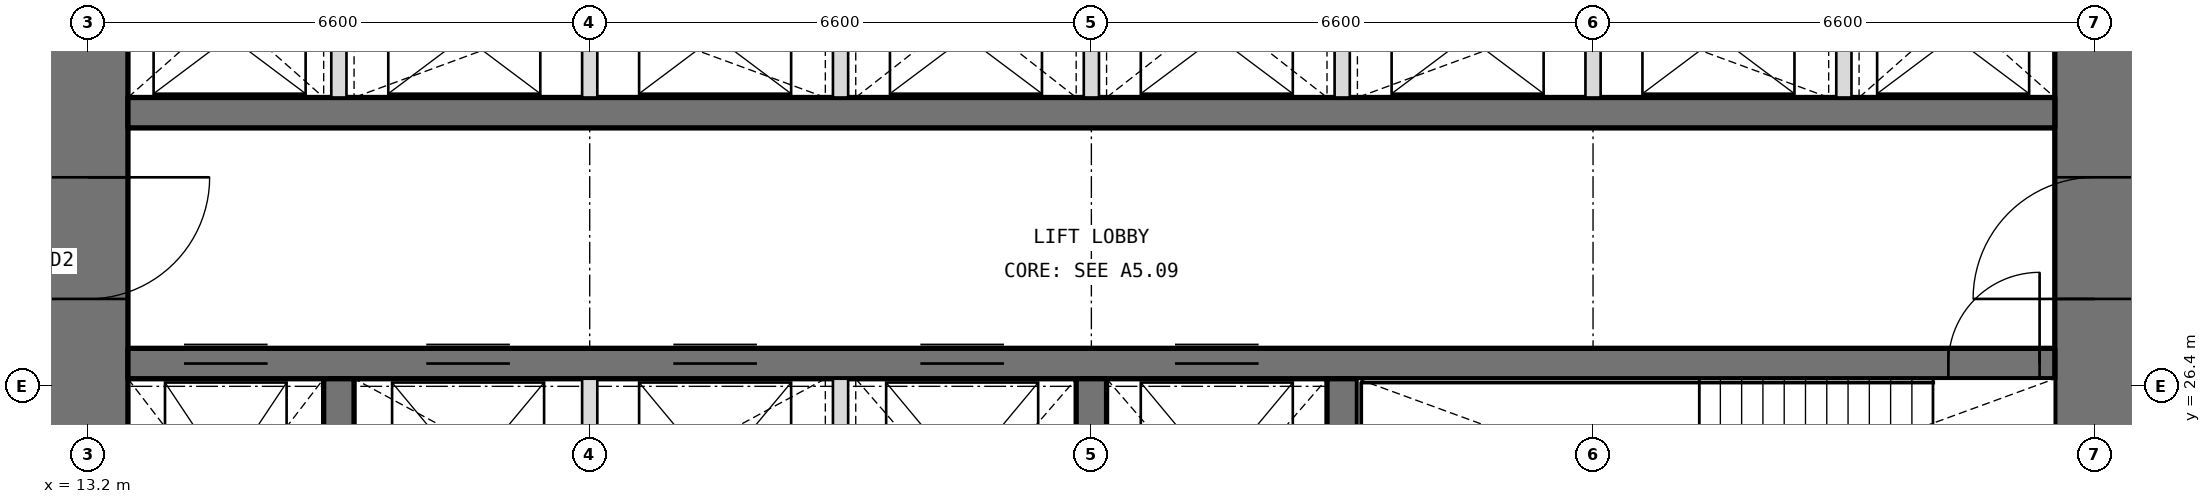
"""IFC4 building model, lengths in metres.
Left out: names, types, materials, properties, quantities, classifications, styles, units other than length and angle.
Written with IfcOpenShell. Run it as: python <this file> out.ifc"""

import sys

from ifc_helpers import new_model, si_unit, direction, frame, frame_2d, origin, place, context, subcontext, project, spatial, rectangle, extrude, element, fill, save


model = new_model("IFC4")
c1 = context("Model", 3, precision=1e-05, world=origin(), true_north=direction((0.0, 1.0)))
c2 = subcontext(c1, "Body", "Model", "MODEL_VIEW")
j1 = project(units=[si_unit("LENGTHUNIT", "METRE"), si_unit("PLANEANGLEUNIT", "RADIAN")], contexts=[c1])
p1 = place(None, origin())
s1 = spatial("IfcSite", under=j1, at=p1, CompositionType="ELEMENT")
p2 = place(p1, origin())
s2 = spatial("IfcBuilding", under=s1, at=p2, CompositionType="ELEMENT")
p3 = place(p2, frame((0.0, 0.0, 33.9)))
s3 = spatial("IfcBuildingStorey", under=s2, at=p3, CompositionType="ELEMENT", Elevation=33.9)
p4 = place(p3, frame((39.6, 13.725, 0.0), z_axis=(0.0, 0.0, 1.0), x_axis=(0.0, 1.0, 0.0)))
e1 = element("IfcWall", 1, at=p4, inside=s3, PredefinedType="SHEAR", context=c2, shape_type="SweptSolid", body=[
    extrude(rectangle(XDim=18.75, YDim=1.05, at=frame_2d((9.375, 0.0))), origin(), (0.0, 0.0, 1.0), 4.2),
])
p5 = place(p4, frame((3.025, 0.0, 0.0)))
e2 = element("IfcOpeningElement", 2, at=p5, cuts=e1, PredefinedType="OPENING", context=c2, shape_type="SweptSolid", body=[
    extrude(rectangle(XDim=1.6, YDim=2.1, at=frame_2d((0.8, 1.05))), frame((0.0, 0.535, 0.0), z_axis=(0.0, -1.0, 0.0), x_axis=(1.0, 0.0, 0.0)), (0.0, 0.0, 1.0), 1.07),
])
p6 = place(p4, frame((13.825, 0.0, 0.0)))
e3 = element("IfcOpeningElement", 3, at=p6, cuts=e1, PredefinedType="OPENING", context=c2, shape_type="SweptSolid", body=[
    extrude(rectangle(XDim=1.6, YDim=2.1, at=frame_2d((0.8, 1.05))), frame((0.0, 0.535, 0.0), z_axis=(0.0, -1.0, 0.0), x_axis=(1.0, 0.0, 0.0)), (0.0, 0.0, 1.0), 1.07),
])
p7 = place(p3, frame((13.2, 32.475, 0.0), z_axis=(0.0, 0.0, 1.0), x_axis=(0.0, -1.0, 0.0)))
e4 = element("IfcWall", 4, at=p7, inside=s3, PredefinedType="SHEAR", context=c2, shape_type="SweptSolid", body=[
    extrude(rectangle(XDim=18.75, YDim=1.05, at=frame_2d((9.375, 0.0))), origin(), (0.0, 0.0, 1.0), 4.2),
])
p8 = place(p7, frame((14.125, 0.0, 0.0)))
e5 = element("IfcOpeningElement", 5, at=p8, cuts=e4, PredefinedType="OPENING", context=c2, shape_type="SweptSolid", body=[
    extrude(rectangle(XDim=1.6, YDim=2.1, at=frame_2d((0.8, 1.05))), frame((0.0, 0.535, 0.0), z_axis=(0.0, -1.0, 0.0), x_axis=(1.0, 0.0, 0.0)), (0.0, 0.0, 1.0), 1.07),
])
p9 = place(p7, frame((3.325, 0.0, 0.0)))
e6 = element("IfcOpeningElement", 6, at=p9, cuts=e4, PredefinedType="OPENING", context=c2, shape_type="SweptSolid", body=[
    extrude(rectangle(XDim=1.6, YDim=2.1, at=frame_2d((0.8, 1.05))), frame((0.0, 0.535, 0.0), z_axis=(0.0, -1.0, 0.0), x_axis=(1.0, 0.0, 0.0)), (0.0, 0.0, 1.0), 1.07),
])
p10 = place(p3, frame((13.725, 26.7, 0.0), z_axis=(0.0, 0.0, 1.0), x_axis=(1.0, 0.0, 0.0)))
e7 = element("IfcWall", 7, at=p10, inside=s3, PredefinedType="SHEAR", context=c2, shape_type="SweptSolid", body=[
    extrude(rectangle(XDim=25.35, YDim=0.4, at=frame_2d((12.675, 0.0))), origin(), (0.0, 0.0, 1.0), 4.2),
])
p11 = place(p10, frame((23.95, 0.0, 0.0)))
e8 = element("IfcOpeningElement", 8, at=p11, cuts=e7, PredefinedType="OPENING", context=c2, shape_type="SweptSolid", body=[
    extrude(rectangle(XDim=1.2, YDim=2.1, at=frame_2d((0.6, 1.05))), frame((0.0, 0.21, 0.0), z_axis=(0.0, -1.0, 0.0), x_axis=(1.0, 0.0, 0.0)), (0.0, 0.0, 1.0), 0.42),
])
p12 = place(p10, frame((0.738, 0.0, 0.0)))
e9 = element("IfcOpeningElement", 9, at=p12, cuts=e7, PredefinedType="OPENING", context=c2, shape_type="SweptSolid", body=[
    extrude(rectangle(XDim=1.1, YDim=2.1, at=frame_2d((0.55, 1.05))), frame((0.0, 0.21, 0.0), z_axis=(0.0, -1.0, 0.0), x_axis=(1.0, 0.0, 0.0)), (0.0, 0.0, 1.0), 0.42),
])
p13 = place(p10, frame((3.925, 0.0, 0.0)))
e10 = element("IfcOpeningElement", 10, at=p13, cuts=e7, PredefinedType="OPENING", context=c2, shape_type="SweptSolid", body=[
    extrude(rectangle(XDim=1.1, YDim=2.1, at=frame_2d((0.55, 1.05))), frame((0.0, 0.21, 0.0), z_axis=(0.0, -1.0, 0.0), x_axis=(1.0, 0.0, 0.0)), (0.0, 0.0, 1.0), 0.42),
])
p14 = place(p10, frame((7.175, 0.0, 0.0)))
e11 = element("IfcOpeningElement", 11, at=p14, cuts=e7, PredefinedType="OPENING", context=c2, shape_type="SweptSolid", body=[
    extrude(rectangle(XDim=1.1, YDim=2.1, at=frame_2d((0.55, 1.05))), frame((0.0, 0.21, 0.0), z_axis=(0.0, -1.0, 0.0), x_axis=(1.0, 0.0, 0.0)), (0.0, 0.0, 1.0), 0.42),
])
p15 = place(p10, frame((10.425, 0.0, 0.0)))
e12 = element("IfcOpeningElement", 12, at=p15, cuts=e7, PredefinedType="OPENING", context=c2, shape_type="SweptSolid", body=[
    extrude(rectangle(XDim=1.1, YDim=2.1, at=frame_2d((0.55, 1.05))), frame((0.0, 0.21, 0.0), z_axis=(0.0, -1.0, 0.0), x_axis=(1.0, 0.0, 0.0)), (0.0, 0.0, 1.0), 0.42),
])
p16 = place(p10, frame((13.775, 0.0, 0.0)))
e13 = element("IfcOpeningElement", 13, at=p16, cuts=e7, PredefinedType="OPENING", context=c2, shape_type="SweptSolid", body=[
    extrude(rectangle(XDim=1.1, YDim=2.1, at=frame_2d((0.55, 1.05))), frame((0.0, 0.21, 0.0), z_axis=(0.0, -1.0, 0.0), x_axis=(1.0, 0.0, 0.0)), (0.0, 0.0, 1.0), 0.42),
])
p17 = place(p3, frame((13.725, 30.0, 0.0), z_axis=(0.0, 0.0, 1.0), x_axis=(1.0, 0.0, 0.0)))
e14 = element("IfcWall", 14, at=p17, inside=s3, PredefinedType="SHEAR", context=c2, shape_type="SweptSolid", body=[
    extrude(rectangle(XDim=25.35, YDim=0.4, at=frame_2d((12.675, 0.0))), origin(), (0.0, 0.0, 1.0), 4.2),
])
for number, where, z_axis, x_axis in (
    (15, (16.5, 23.15, 0.0), (0.0, 0.0, 1.0), (0.0, 1.0, 0.0)),
    (16, (26.4, 23.15, 0.0), (0.0, 0.0, 1.0), (0.0, 1.0, 0.0)),
    (17, (29.7, 23.15, 0.0), (0.0, 0.0, 1.0), (0.0, 1.0, 0.0)),
):
    element("IfcWall", number, at=place(p3, frame(where, z_axis=z_axis, x_axis=x_axis)), inside=s3, PredefinedType="SHEAR", context=c2, shape_type="SweptSolid", body=[
        extrude(rectangle(XDim=3.35, YDim=0.4, at=frame_2d((1.675, 0.0))), origin(), (0.0, 0.0, 1.0), 4.2),
    ])
for number, where, z_axis, x_axis in (
    (18, (16.5, 30.2, 0.0), (0.0, 0.0, 1.0), (0.0, 1.0, 0.0)),
    (19, (19.8, 30.2, 0.0), (0.0, 0.0, 1.0), (0.0, 1.0, 0.0)),
    (20, (23.1, 30.2, 0.0), (0.0, 0.0, 1.0), (0.0, 1.0, 0.0)),
    (21, (26.4, 30.2, 0.0), (0.0, 0.0, 1.0), (0.0, 1.0, 0.0)),
    (22, (29.7, 30.2, 0.0), (0.0, 0.0, 1.0), (0.0, 1.0, 0.0)),
    (23, (33.0, 30.2, 0.0), (0.0, 0.0, 1.0), (0.0, 1.0, 0.0)),
    (24, (36.3, 30.2, 0.0), (0.0, 0.0, 1.0), (0.0, 1.0, 0.0)),
):
    element("IfcWall", number, at=place(p3, frame(where, z_axis=z_axis, x_axis=x_axis)), inside=s3, PredefinedType="PARTITIONING", context=c2, shape_type="SweptSolid", body=[
        extrude(rectangle(XDim=2.275, YDim=0.2, at=frame_2d((1.138, 0.0))), origin(), (0.0, 0.0, 1.0), 4.2),
    ])
for number, where, z_axis, x_axis in (
    (25, (19.8, 23.15, 0.0), (0.0, 0.0, 1.0), (0.0, 1.0, 0.0)),
    (26, (23.1, 23.15, 0.0), (0.0, 0.0, 1.0), (0.0, 1.0, 0.0)),
):
    element("IfcWall", number, at=place(p3, frame(where, z_axis=z_axis, x_axis=x_axis)), inside=s3, PredefinedType="PARTITIONING", context=c2, shape_type="SweptSolid", body=[
        extrude(rectangle(XDim=3.35, YDim=0.2, at=frame_2d((1.675, 0.0))), origin(), (0.0, 0.0, 1.0), 4.2),
    ])
p18 = place(p11, origin())
e27 = element("IfcDoor", 27, at=p18, inside=s3, OperationType="SINGLE_SWING_RIGHT", PredefinedType="DOOR", context=c2, shape_type="SweptSolid", body=[
    extrude(rectangle(XDim=1.2, YDim=2.1, at=frame_2d((0.6, 1.05))), frame((0.0, 0.025, 0.0), z_axis=(0.0, -1.0, 0.0), x_axis=(1.0, 0.0, 0.0)), (0.0, 0.0, 1.0), 0.05),
])
fill(e8, e27)
p19 = place(p9, origin())
e28 = element("IfcDoor", 28, at=p19, inside=s3, OperationType="DOUBLE_DOOR_DOUBLE_SWING", PredefinedType="DOOR", context=c2, shape_type="SweptSolid", body=[
    extrude(rectangle(XDim=1.6, YDim=2.1, at=frame_2d((0.8, 1.05))), frame((0.0, 0.025, 0.0), z_axis=(0.0, -1.0, 0.0), x_axis=(1.0, 0.0, 0.0)), (0.0, 0.0, 1.0), 0.05),
])
fill(e6, e28)
p20 = place(p6, origin())
e29 = element("IfcDoor", 29, at=p20, inside=s3, OperationType="DOUBLE_DOOR_DOUBLE_SWING", PredefinedType="DOOR", context=c2, shape_type="SweptSolid", body=[
    extrude(rectangle(XDim=1.6, YDim=2.1, at=frame_2d((0.8, 1.05))), frame((0.0, 0.025, 0.0), z_axis=(0.0, -1.0, 0.0), x_axis=(1.0, 0.0, 0.0)), (0.0, 0.0, 1.0), 0.05),
])
fill(e3, e29)
p21 = place(p12, origin())
e30 = element("IfcDoor", 30, at=p21, inside=s3, OperationType="DOUBLE_DOOR_SLIDING", PredefinedType="DOOR", context=c2, shape_type="SweptSolid", body=[
    extrude(rectangle(XDim=1.1, YDim=2.1, at=frame_2d((0.55, 1.05))), frame((0.0, 0.025, 0.0), z_axis=(0.0, -1.0, 0.0), x_axis=(1.0, 0.0, 0.0)), (0.0, 0.0, 1.0), 0.05),
])
fill(e9, e30)
p22 = place(p13, origin())
e31 = element("IfcDoor", 31, at=p22, inside=s3, OperationType="DOUBLE_DOOR_SLIDING", PredefinedType="DOOR", context=c2, shape_type="SweptSolid", body=[
    extrude(rectangle(XDim=1.1, YDim=2.1, at=frame_2d((0.55, 1.05))), frame((0.0, 0.025, 0.0), z_axis=(0.0, -1.0, 0.0), x_axis=(1.0, 0.0, 0.0)), (0.0, 0.0, 1.0), 0.05),
])
fill(e10, e31)
p23 = place(p14, origin())
e32 = element("IfcDoor", 32, at=p23, inside=s3, OperationType="DOUBLE_DOOR_SLIDING", PredefinedType="DOOR", context=c2, shape_type="SweptSolid", body=[
    extrude(rectangle(XDim=1.1, YDim=2.1, at=frame_2d((0.55, 1.05))), frame((0.0, 0.025, 0.0), z_axis=(0.0, -1.0, 0.0), x_axis=(1.0, 0.0, 0.0)), (0.0, 0.0, 1.0), 0.05),
])
fill(e11, e32)
p24 = place(p15, origin())
e33 = element("IfcDoor", 33, at=p24, inside=s3, OperationType="DOUBLE_DOOR_SLIDING", PredefinedType="DOOR", context=c2, shape_type="SweptSolid", body=[
    extrude(rectangle(XDim=1.1, YDim=2.1, at=frame_2d((0.55, 1.05))), frame((0.0, 0.025, 0.0), z_axis=(0.0, -1.0, 0.0), x_axis=(1.0, 0.0, 0.0)), (0.0, 0.0, 1.0), 0.05),
])
fill(e12, e33)
p25 = place(p16, origin())
e34 = element("IfcDoor", 34, at=p25, inside=s3, OperationType="DOUBLE_DOOR_SLIDING", PredefinedType="DOOR", context=c2, shape_type="SweptSolid", body=[
    extrude(rectangle(XDim=1.1, YDim=2.1, at=frame_2d((0.55, 1.05))), frame((0.0, 0.025, 0.0), z_axis=(0.0, -1.0, 0.0), x_axis=(1.0, 0.0, 0.0)), (0.0, 0.0, 1.0), 0.05),
])
fill(e13, e34)
save(model, sys.argv[1])
